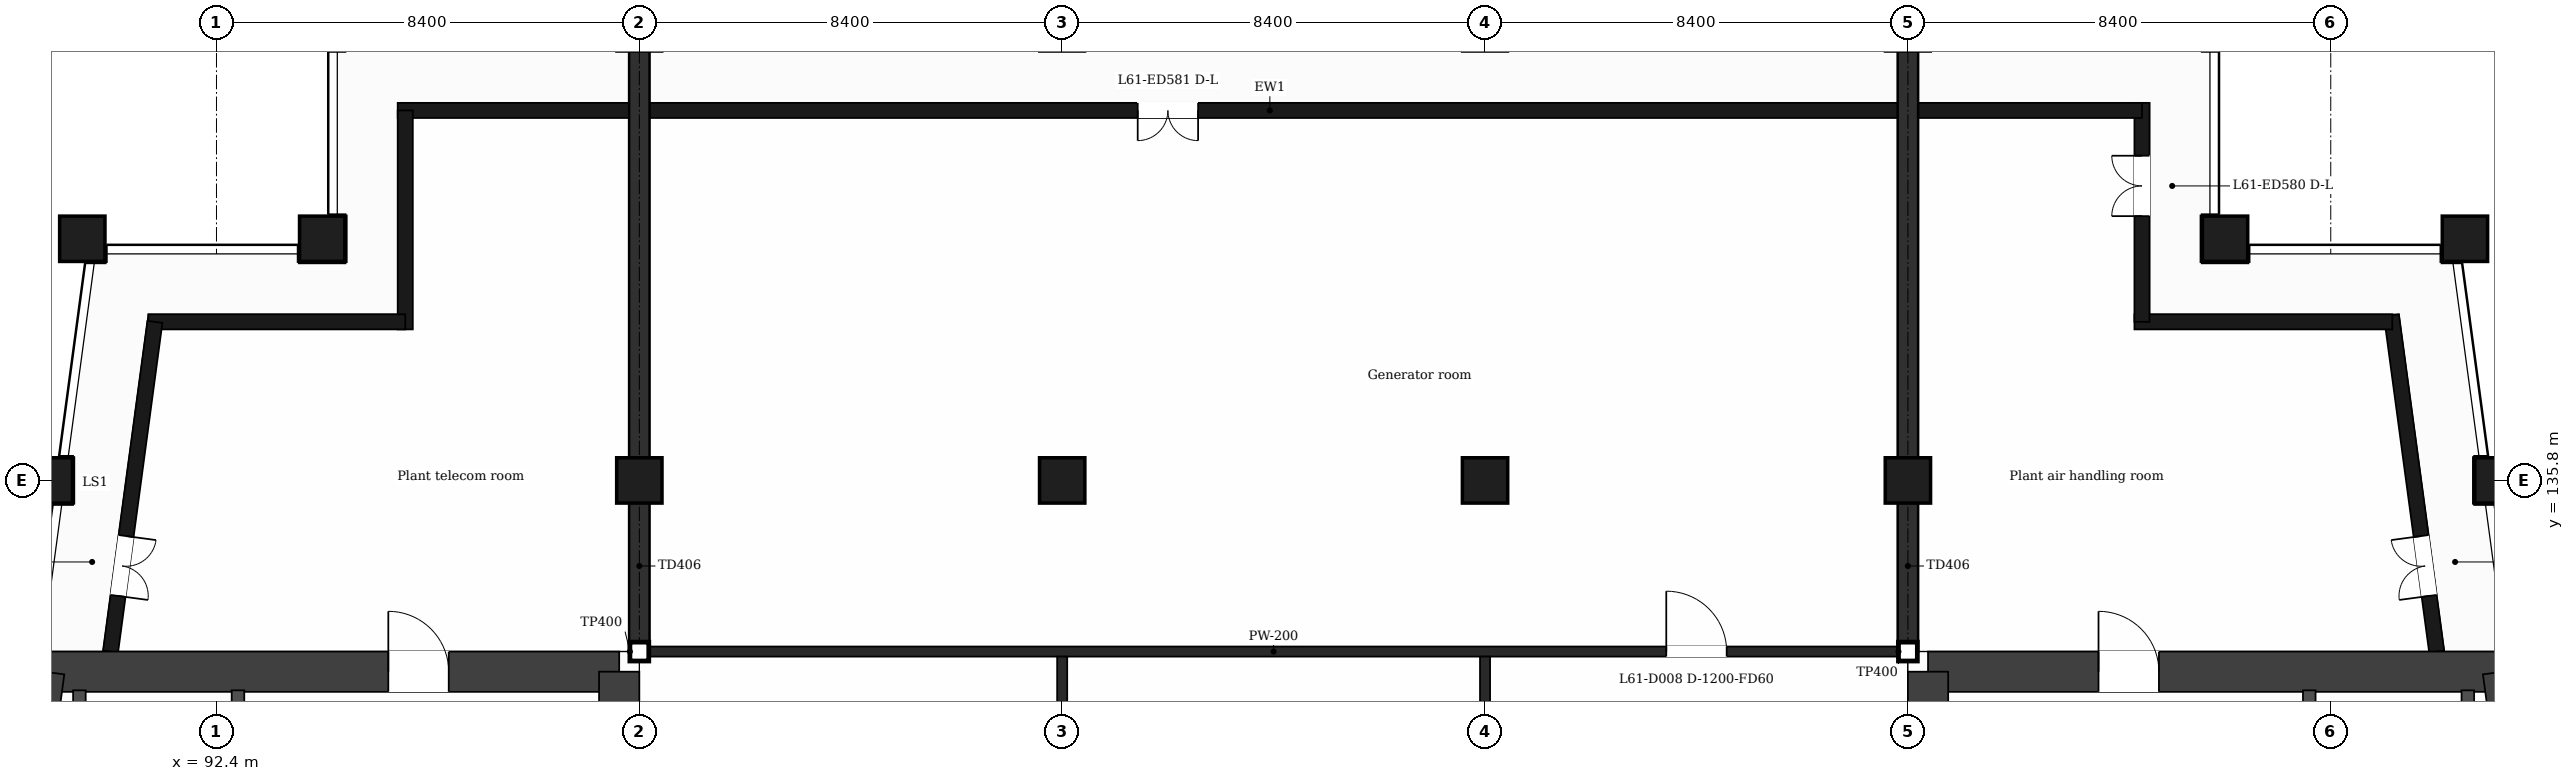
"""IFC4 building model, lengths in metres.
Left out: names, types, materials, properties, quantities, classifications, styles, units other than length and angle.
Written with IfcOpenShell. Run it as: python <this file> out.ifc"""

import sys

from ifc_helpers import new_model, si_unit, direction, frame, frame_2d, origin, origin_2d, place, context, subcontext, project, spatial, rectangle, extrude, element, fill, save


model = new_model("IFC4")
c1 = context("Model", 3, precision=1e-05, world=origin(), true_north=direction((0.0, 1.0)))
c2 = subcontext(c1, "Body", "Model", "MODEL_VIEW")
j1 = project(units=[si_unit("LENGTHUNIT", "METRE"), si_unit("PLANEANGLEUNIT", "RADIAN")], contexts=[c1])
p1 = place(None, origin())
s1 = spatial("IfcSite", under=j1, at=p1, CompositionType="ELEMENT")
p2 = place(p1, origin())
s2 = spatial("IfcBuilding", under=s1, at=p2, CompositionType="ELEMENT")
p3 = place(p2, frame((0.0, 0.0, 254.0)))
s3 = spatial("IfcBuildingStorey", under=s2, at=p3, CompositionType="ELEMENT", Elevation=254.0)
p4 = place(p3, frame((88.98, 132.0, 0.0), z_axis=(0.0, 0.0, 1.0), x_axis=(1.0, 0.0, 0.0)))
e1 = element("IfcWall", 1, at=p4, inside=s3, PredefinedType="SHEAR", context=c2, shape_type="SweptSolid", body=[
    extrude(rectangle(XDim=11.419, YDim=0.8, at=frame_2d((5.71, 0.0))), origin(), (0.0, 0.0, 1.0), 5.0),
])
p5 = place(p4, frame((6.833, 0.0, 0.0)))
e2 = element("IfcOpeningElement", 2, at=p5, cuts=e1, PredefinedType="OPENING", context=c2, shape_type="SweptSolid", body=[
    extrude(rectangle(XDim=1.2, YDim=2.1, at=frame_2d((0.6, 1.05))), frame((0.0, 0.41, 0.0), z_axis=(0.0, -1.0, 0.0), x_axis=(1.0, 0.0, 0.0)), (0.0, 0.0, 1.0), 0.82),
])
p6 = place(p3, frame((100.4, 132.0, 0.0), z_axis=(0.0, 0.0, 1.0), x_axis=(0.0, -1.0, 0.0)))
e3 = element("IfcWall", 3, at=p6, inside=s3, PredefinedType="SHEAR", context=c2, shape_type="SweptSolid", body=[
    extrude(rectangle(XDim=21.2, YDim=0.8, at=frame_2d((10.6, 0.0))), origin(), (0.0, 0.0, 1.0), 5.0),
])
p7 = place(p6, frame((2.4, 0.0, 0.0)))
e4 = element("IfcOpeningElement", 4, at=p7, cuts=e3, PredefinedType="OPENING", context=c2, shape_type="SweptSolid", body=[
    extrude(rectangle(XDim=1.2, YDim=2.1, at=frame_2d((0.6, 1.05))), frame((0.0, 0.41, 0.0), z_axis=(0.0, -1.0, 0.0), x_axis=(1.0, 0.0, 0.0)), (0.0, 0.0, 1.0), 0.82),
])
p8 = place(p6, frame((7.85, 0.0, 0.0)))
e5 = element("IfcOpeningElement", 5, at=p8, cuts=e3, PredefinedType="OPENING", context=c2, shape_type="SweptSolid", body=[
    extrude(rectangle(XDim=1.4, YDim=2.1, at=frame_2d((0.7, 1.05))), frame((0.0, 0.41, 0.0), z_axis=(0.0, -1.0, 0.0), x_axis=(1.0, 0.0, 0.0)), (0.0, 0.0, 1.0), 0.82),
])
p9 = place(p3, frame((86.127, 110.8, 0.0), z_axis=(0.0, 0.0, 1.0), x_axis=(0.133408347329, 0.991061154956, 0.0)))
e6 = element("IfcWall", 6, at=p9, inside=s3, PredefinedType="SHEAR", context=c2, shape_type="SweptSolid", body=[
    extrude(rectangle(XDim=21.391, YDim=0.8, at=frame_2d((10.696, 0.0))), origin(), (0.0, 0.0, 1.0), 5.0),
])
p10 = place(p3, frame((126.4, 132.0, 0.0), z_axis=(0.0, 0.0, 1.0), x_axis=(1.0, 0.0, 0.0)))
e7 = element("IfcWall", 7, at=p10, inside=s3, PredefinedType="SHEAR", context=c2, shape_type="SweptSolid", body=[
    extrude(rectangle(XDim=11.42, YDim=0.8, at=frame_2d((5.71, 0.0))), origin(), (0.0, 0.0, 1.0), 5.0),
])
p11 = place(p10, frame((3.386, 0.0, 0.0)))
e8 = element("IfcOpeningElement", 8, at=p11, cuts=e7, PredefinedType="OPENING", context=c2, shape_type="SweptSolid", body=[
    extrude(rectangle(XDim=1.2, YDim=2.1, at=frame_2d((0.6, 1.05))), frame((0.0, 0.41, 0.0), z_axis=(0.0, -1.0, 0.0), x_axis=(1.0, 0.0, 0.0)), (0.0, 0.0, 1.0), 0.82),
])
p12 = place(p3, frame((137.82, 132.0, 0.0), z_axis=(0.0, 0.0, 1.0), x_axis=(0.133408347329, -0.991061154956, 0.0)))
e9 = element("IfcWall", 9, at=p12, inside=s3, PredefinedType="SHEAR", context=c2, shape_type="SweptSolid", body=[
    extrude(rectangle(XDim=21.391, YDim=0.8, at=frame_2d((10.696, 0.0))), origin(), (0.0, 0.0, 1.0), 5.0),
])
p13 = place(p3, frame((126.4, 110.8, 0.0), z_axis=(0.0, 0.0, 1.0), x_axis=(0.0, 1.0, 0.0)))
e10 = element("IfcWall", 10, at=p13, inside=s3, PredefinedType="SHEAR", context=c2, shape_type="SweptSolid", body=[
    extrude(rectangle(XDim=21.2, YDim=0.8, at=frame_2d((10.6, 0.0))), origin(), (0.0, 0.0, 1.0), 5.0),
])
p14 = place(p13, frame((1.0, 0.0, 0.0)))
e11 = element("IfcOpeningElement", 11, at=p14, cuts=e10, PredefinedType="OPENING", context=c2, shape_type="SweptSolid", body=[
    extrude(rectangle(XDim=1.2, YDim=2.1, at=frame_2d((0.6, 1.05))), frame((0.0, 0.41, 0.0), z_axis=(0.0, -1.0, 0.0), x_axis=(1.0, 0.0, 0.0)), (0.0, 0.0, 1.0), 0.82),
])
p15 = place(p13, frame((11.95, 0.0, 0.0)))
e12 = element("IfcOpeningElement", 12, at=p15, cuts=e10, PredefinedType="OPENING", context=c2, shape_type="SweptSolid", body=[
    extrude(rectangle(XDim=1.4, YDim=2.1, at=frame_2d((0.7, 1.05))), frame((0.0, 0.41, 0.0), z_axis=(0.0, -1.0, 0.0), x_axis=(1.0, 0.0, 0.0)), (0.0, 0.0, 1.0), 0.82),
])
for number, where, z_axis, x_axis in (
    (13, (94.5, 140.6, 0.0), (0.0, 0.0, 1.0), (1.0, 0.0, 0.0)),
    (14, (132.3, 140.6, 0.0), (0.0, 0.0, 1.0), (1.0, 0.0, 0.0)),
    (15, (89.735, 140.6, 0.0), (0.0, 0.0, 1.0), (1.0, 0.0, 0.0)),
    (16, (137.065, 140.6, 0.0), (0.0, 0.0, 1.0), (1.0, 0.0, 0.0)),
    (17, (100.8, 135.8, 0.0), (0.0, 0.0, 1.0), (1.0, 0.0, 0.0)),
    (18, (109.2, 135.8, 0.0), (0.0, 0.0, 1.0), (1.0, 0.0, 0.0)),
    (19, (117.6, 135.8, 0.0), (0.0, 0.0, 1.0), (1.0, 0.0, 0.0)),
    (20, (126.0, 135.8, 0.0), (0.0, 0.0, 1.0), (1.0, 0.0, 0.0)),
    (21, (89.088, 135.8, 0.0), (0.0, 0.0, 1.0), (1.0, 0.0, 0.0)),
    (22, (137.711, 135.8, 0.0), (0.0, 0.0, 1.0), (1.0, 0.0, 0.0)),
):
    element("IfcColumn", number, at=place(p3, frame(where, z_axis=z_axis, x_axis=x_axis)), inside=s3, PredefinedType="COLUMN", context=c2, shape_type="SweptSolid", body=[
        extrude(rectangle(XDim=0.9, YDim=0.9, at=origin_2d()), origin(), (0.0, 0.0, 1.0), 5.0),
    ])
p16 = place(p3, frame((136.504, 132.4, 0.0), z_axis=(0.0, 0.0, 1.0), x_axis=(-0.133399697462, 0.99106231929, 0.0)))
e23 = element("IfcWall", 23, at=p16, inside=s3, PredefinedType="SOLIDWALL", context=c2, shape_type="SweptSolid", body=[
    extrude(rectangle(XDim=6.74, YDim=0.3, at=frame_2d((3.37, 0.0))), origin(), (0.0, 0.0, 1.0), 4.68),
])
p17 = place(p16, frame((1.115, 0.0, 0.0)))
e24 = element("IfcOpeningElement", 24, at=p17, cuts=e23, PredefinedType="OPENING", context=c2, shape_type="SweptSolid", body=[
    extrude(rectangle(XDim=1.2, YDim=2.4, at=frame_2d((0.6, 1.2))), frame((0.0, 0.16, 0.0), z_axis=(0.0, -1.0, 0.0), x_axis=(1.0, 0.0, 0.0)), (0.0, 0.0, 1.0), 0.32),
])
p18 = place(p3, frame((135.623, 138.95, 0.0), z_axis=(0.0, 0.0, 1.0), x_axis=(-1.0, 0.0, 0.0)))
e25 = element("IfcWall", 25, at=p18, inside=s3, PredefinedType="SOLIDWALL", context=c2, shape_type="SweptSolid", body=[
    extrude(rectangle(XDim=5.123, YDim=0.3, at=frame_2d((2.561, 0.0))), origin(), (0.0, 0.0, 1.0), 4.68),
])
p19 = place(p3, frame((130.65, 138.95, 0.0), z_axis=(0.0, 0.0, 1.0), x_axis=(0.0, 1.0, 0.0)))
e26 = element("IfcWall", 26, at=p19, inside=s3, PredefinedType="SOLIDWALL", context=c2, shape_type="SweptSolid", body=[
    extrude(rectangle(XDim=4.35, YDim=0.3, at=frame_2d((2.175, 0.0))), origin(), (0.0, 0.0, 1.0), 4.68),
])
p20 = place(p19, frame((2.1, 0.0, 0.0)))
e27 = element("IfcOpeningElement", 27, at=p20, cuts=e26, PredefinedType="OPENING", context=c2, shape_type="SweptSolid", body=[
    extrude(rectangle(XDim=1.2, YDim=2.4, at=frame_2d((0.6, 1.2))), frame((0.0, 0.16, 0.0), z_axis=(0.0, -1.0, 0.0), x_axis=(1.0, 0.0, 0.0)), (0.0, 0.0, 1.0), 0.32),
])
p21 = place(p3, frame((130.65, 143.15, 0.0), z_axis=(0.0, 0.0, 1.0), x_axis=(-1.0, 0.0, 0.0)))
e28 = element("IfcWall", 28, at=p21, inside=s3, PredefinedType="SOLIDWALL", context=c2, shape_type="SweptSolid", body=[
    extrude(rectangle(XDim=34.65, YDim=0.3, at=frame_2d((17.325, 0.0))), origin(), (0.0, 0.0, 1.0), 4.68),
])
p22 = place(p21, frame((18.75, 0.0, 0.0)))
e29 = element("IfcOpeningElement", 29, at=p22, cuts=e28, PredefinedType="OPENING", context=c2, shape_type="SweptSolid", body=[
    extrude(rectangle(XDim=1.2, YDim=2.4, at=frame_2d((0.6, 1.2))), frame((0.0, 0.16, 0.0), z_axis=(0.0, -1.0, 0.0), x_axis=(1.0, 0.0, 0.0)), (0.0, 0.0, 1.0), 0.32),
])
p23 = place(p3, frame((96.15, 143.15, 0.0), z_axis=(0.0, 0.0, 1.0), x_axis=(0.0, -1.0, 0.0)))
e30 = element("IfcWall", 30, at=p23, inside=s3, PredefinedType="SOLIDWALL", context=c2, shape_type="SweptSolid", body=[
    extrude(rectangle(XDim=4.35, YDim=0.3, at=frame_2d((2.175, 0.0))), origin(), (0.0, 0.0, 1.0), 4.68),
])
p24 = place(p3, frame((96.15, 138.95, 0.0), z_axis=(0.0, 0.0, 1.0), x_axis=(-1.0, 0.0, 0.0)))
e31 = element("IfcWall", 31, at=p24, inside=s3, PredefinedType="SOLIDWALL", context=c2, shape_type="SweptSolid", body=[
    extrude(rectangle(XDim=5.104, YDim=0.3, at=frame_2d((2.552, 0.0))), origin(), (0.0, 0.0, 1.0), 4.68),
])
p25 = place(p3, frame((91.177, 138.95, 0.0), z_axis=(0.0, 0.0, 1.0), x_axis=(-0.133426664613, -0.991058689065, 0.0)))
e32 = element("IfcWall", 32, at=p25, inside=s3, PredefinedType="SOLIDWALL", context=c2, shape_type="SweptSolid", body=[
    extrude(rectangle(XDim=6.609, YDim=0.3, at=frame_2d((3.305, 0.0))), origin(), (0.0, 0.0, 1.0), 4.68),
])
p26 = place(p25, frame((4.294, 0.0, 0.0)))
e33 = element("IfcOpeningElement", 33, at=p26, cuts=e32, PredefinedType="OPENING", context=c2, shape_type="SweptSolid", body=[
    extrude(rectangle(XDim=1.2, YDim=2.4, at=frame_2d((0.6, 1.2))), frame((0.0, 0.16, 0.0), z_axis=(0.0, -1.0, 0.0), x_axis=(1.0, 0.0, 0.0)), (0.0, 0.0, 1.0), 0.32),
])
p27 = place(p3, frame((100.7, 132.4, 0.0), z_axis=(0.0, 0.0, 1.0), x_axis=(1.0, 0.0, 0.0)))
e34 = element("IfcWall", 34, at=p27, inside=s3, PredefinedType="PARTITIONING", context=c2, shape_type="SweptSolid", body=[
    extrude(rectangle(XDim=25.4, YDim=0.2, at=frame_2d((12.7, 0.0))), origin(), (0.0, 0.0, 1.0), 4.68),
])
p28 = place(p27, frame((20.5, 0.0, 0.0)))
e35 = element("IfcOpeningElement", 35, at=p28, cuts=e34, PredefinedType="OPENING", context=c2, shape_type="SweptSolid", body=[
    extrude(rectangle(XDim=1.2, YDim=2.1, at=frame_2d((0.6, 1.05))), frame((0.0, 0.11, 0.0), z_axis=(0.0, -1.0, 0.0), x_axis=(1.0, 0.0, 0.0)), (0.0, 0.0, 1.0), 0.22),
])
p29 = place(p3, frame((89.677, 124.575, 0.0), z_axis=(0.0, 0.0, 1.0), x_axis=(0.0, 1.0, 0.0)))
e36 = element("IfcWall", 36, at=p29, inside=s3, PredefinedType="PARTITIONING", context=c2, shape_type="SweptSolid", body=[
    extrude(rectangle(XDim=7.055, YDim=0.25, at=frame_2d((3.527, 0.0))), origin(), (0.0, 0.0, 1.0), 4.68),
])
p30 = place(p3, frame((92.827, 124.575, 0.0), z_axis=(0.0, 0.0, 1.0), x_axis=(0.0, 1.0, 0.0)))
e37 = element("IfcWall", 37, at=p30, inside=s3, PredefinedType="PARTITIONING", context=c2, shape_type="SweptSolid", body=[
    extrude(rectangle(XDim=7.055, YDim=0.25, at=frame_2d((3.527, 0.0))), origin(), (0.0, 0.0, 1.0), 4.68),
])
p31 = place(p30, frame((5.325, 0.0, 0.0)))
e38 = element("IfcOpeningElement", 38, at=p31, cuts=e37, PredefinedType="OPENING", context=c2, shape_type="SweptSolid", body=[
    extrude(rectangle(XDim=1.0, YDim=2.1, at=frame_2d((0.5, 1.05))), frame((0.0, 0.135, 0.0), z_axis=(0.0, -1.0, 0.0), x_axis=(1.0, 0.0, 0.0)), (0.0, 0.0, 1.0), 0.27),
])
p32 = place(p3, frame((100.8, 132.5, 0.0), z_axis=(0.0, 0.0, 1.0), x_axis=(0.0, 1.0, 0.0)))
e39 = element("IfcWall", 39, at=p32, inside=s3, PredefinedType="PARTITIONING", context=c2, shape_type="SweptSolid", body=[
    extrude(rectangle(XDim=10.51, YDim=0.2, at=frame_2d((5.255, 0.0))), origin(), (0.0, 0.0, 1.0), 4.68),
])
for number, where, z_axis, x_axis in (
    (40, (109.2, 124.875, 0.0), (0.0, 0.0, 1.0), (0.0, 1.0, 0.0)),
    (41, (117.6, 124.875, 0.0), (0.0, 0.0, 1.0), (0.0, 1.0, 0.0)),
):
    element("IfcWall", number, at=place(p3, frame(where, z_axis=z_axis, x_axis=x_axis)), inside=s3, PredefinedType="PARTITIONING", context=c2, shape_type="SweptSolid", body=[
        extrude(rectangle(XDim=7.425, YDim=0.2, at=frame_2d((3.712, 0.0))), origin(), (0.0, 0.0, 1.0), 4.68),
    ])
p33 = place(p3, frame((126.0, 132.5, 0.0), z_axis=(0.0, 0.0, 1.0), x_axis=(0.0, 1.0, 0.0)))
e42 = element("IfcWall", 42, at=p33, inside=s3, PredefinedType="PARTITIONING", context=c2, shape_type="SweptSolid", body=[
    extrude(rectangle(XDim=10.51, YDim=0.2, at=frame_2d((5.255, 0.0))), origin(), (0.0, 0.0, 1.0), 4.68),
])
p34 = place(p3, frame((133.973, 124.575, 0.0), z_axis=(0.0, 0.0, 1.0), x_axis=(0.0, 1.0, 0.0)))
e43 = element("IfcWall", 43, at=p34, inside=s3, PredefinedType="PARTITIONING", context=c2, shape_type="SweptSolid", body=[
    extrude(rectangle(XDim=7.055, YDim=0.25, at=frame_2d((3.527, 0.0))), origin(), (0.0, 0.0, 1.0), 4.68),
])
p35 = place(p34, frame((5.325, 0.0, 0.0)))
e44 = element("IfcOpeningElement", 44, at=p35, cuts=e43, PredefinedType="OPENING", context=c2, shape_type="SweptSolid", body=[
    extrude(rectangle(XDim=1.0, YDim=2.1, at=frame_2d((0.5, 1.05))), frame((0.0, 0.135, 0.0), z_axis=(0.0, -1.0, 0.0), x_axis=(1.0, 0.0, 0.0)), (0.0, 0.0, 1.0), 0.27),
])
p36 = place(p3, frame((137.123, 124.575, 0.0), z_axis=(0.0, 0.0, 1.0), x_axis=(0.0, 1.0, 0.0)))
e45 = element("IfcWall", 45, at=p36, inside=s3, PredefinedType="PARTITIONING", context=c2, shape_type="SweptSolid", body=[
    extrude(rectangle(XDim=7.055, YDim=0.25, at=frame_2d((3.527, 0.0))), origin(), (0.0, 0.0, 1.0), 4.68),
])
p37 = place(p17, origin())
e46 = element("IfcDoor", 46, at=p37, inside=s3, OperationType="DOUBLE_DOOR_SINGLE_SWING", PredefinedType="DOOR", context=c2, shape_type="SweptSolid", body=[
    extrude(rectangle(XDim=1.2, YDim=2.4, at=frame_2d((0.6, 1.2))), frame((0.0, 0.025, 0.0), z_axis=(0.0, -1.0, 0.0), x_axis=(1.0, 0.0, 0.0)), (0.0, 0.0, 1.0), 0.05),
])
fill(e24, e46)
p38 = place(p20, origin())
e47 = element("IfcDoor", 47, at=p38, inside=s3, OperationType="DOUBLE_DOOR_SINGLE_SWING", PredefinedType="DOOR", context=c2, shape_type="SweptSolid", body=[
    extrude(rectangle(XDim=1.2, YDim=2.4, at=frame_2d((0.6, 1.2))), frame((0.0, 0.025, 0.0), z_axis=(0.0, -1.0, 0.0), x_axis=(1.0, 0.0, 0.0)), (0.0, 0.0, 1.0), 0.05),
])
fill(e27, e47)
p39 = place(p22, origin())
e48 = element("IfcDoor", 48, at=p39, inside=s3, OperationType="DOUBLE_DOOR_SINGLE_SWING", PredefinedType="DOOR", context=c2, shape_type="SweptSolid", body=[
    extrude(rectangle(XDim=1.2, YDim=2.4, at=frame_2d((0.6, 1.2))), frame((0.0, 0.025, 0.0), z_axis=(0.0, -1.0, 0.0), x_axis=(1.0, 0.0, 0.0)), (0.0, 0.0, 1.0), 0.05),
])
fill(e29, e48)
p40 = place(p26, origin())
e49 = element("IfcDoor", 49, at=p40, inside=s3, OperationType="DOUBLE_DOOR_SINGLE_SWING", PredefinedType="DOOR", context=c2, shape_type="SweptSolid", body=[
    extrude(rectangle(XDim=1.2, YDim=2.4, at=frame_2d((0.6, 1.2))), frame((0.0, 0.025, 0.0), z_axis=(0.0, -1.0, 0.0), x_axis=(1.0, 0.0, 0.0)), (0.0, 0.0, 1.0), 0.05),
])
fill(e33, e49)
p41 = place(p28, origin())
e50 = element("IfcDoor", 50, at=p41, inside=s3, OperationType="SINGLE_SWING_LEFT", PredefinedType="DOOR", context=c2, shape_type="SweptSolid", body=[
    extrude(rectangle(XDim=1.2, YDim=2.1, at=frame_2d((0.6, 1.05))), frame((0.0, 0.025, 0.0), z_axis=(0.0, -1.0, 0.0), x_axis=(1.0, 0.0, 0.0)), (0.0, 0.0, 1.0), 0.05),
])
fill(e35, e50)
p42 = place(p5, origin())
e51 = element("IfcDoor", 51, at=p42, inside=s3, OperationType="SINGLE_SWING_LEFT", PredefinedType="DOOR", context=c2, shape_type="SweptSolid", body=[
    extrude(rectangle(XDim=1.2, YDim=2.1, at=frame_2d((0.6, 1.05))), frame((0.0, 0.025, 0.0), z_axis=(0.0, -1.0, 0.0), x_axis=(1.0, 0.0, 0.0)), (0.0, 0.0, 1.0), 0.05),
])
fill(e2, e51)
p43 = place(p11, origin())
e52 = element("IfcDoor", 52, at=p43, inside=s3, OperationType="SINGLE_SWING_LEFT", PredefinedType="DOOR", context=c2, shape_type="SweptSolid", body=[
    extrude(rectangle(XDim=1.2, YDim=2.1, at=frame_2d((0.6, 1.05))), frame((0.0, 0.025, 0.0), z_axis=(0.0, -1.0, 0.0), x_axis=(1.0, 0.0, 0.0)), (0.0, 0.0, 1.0), 0.05),
])
fill(e8, e52)
save(model, sys.argv[1])
